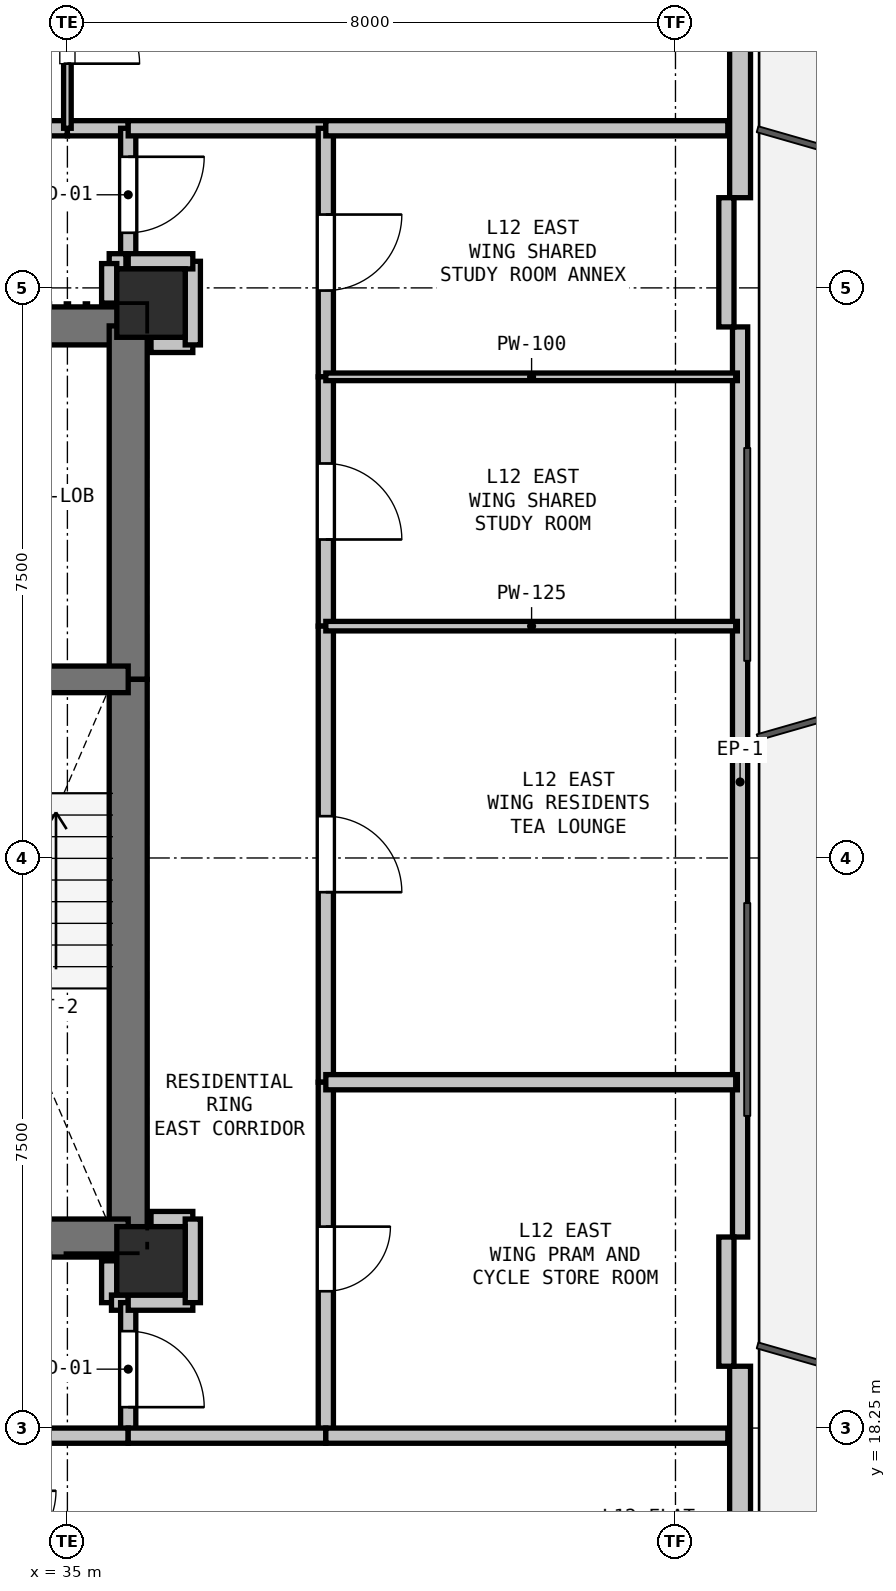
"""IFC4 building model, lengths in metres.
Left out: names, types, materials, properties, quantities, classifications, styles, units other than length and angle.
Written with IfcOpenShell. Run it as: python <this file> out.ifc"""

import sys

from ifc_helpers import new_model, si_unit, direction, frame, frame_2d, origin, origin_2d, place, context, subcontext, project, spatial, rectangle, extrude, element, fill, save


model = new_model("IFC4")
c1 = context("Model", 3, precision=1e-05, world=origin(), true_north=direction((0.0, 1.0)))
c2 = subcontext(c1, "Body", "Model", "MODEL_VIEW")
j1 = project(units=[si_unit("LENGTHUNIT", "METRE"), si_unit("PLANEANGLEUNIT", "RADIAN")], contexts=[c1])
p1 = place(None, origin())
s1 = spatial("IfcSite", under=j1, at=p1, CompositionType="ELEMENT")
p2 = place(p1, origin())
s2 = spatial("IfcBuilding", under=s1, at=p2, CompositionType="ELEMENT")
p3 = place(p2, frame((0.0, 0.0, 45.6)))
s3 = spatial("IfcBuildingStorey", under=s2, at=p3, CompositionType="ELEMENT", Elevation=45.6)
for number, where, z_axis, x_axis in (
    (1, (36.1, 33.05, 0.0), (0.0, 0.0, 1.0), (1.0, 0.0, 0.0)),
    (2, (36.1, 20.45, 0.0), (0.0, 0.0, 1.0), (1.0, 0.0, 0.0)),
):
    element("IfcColumn", number, at=place(p3, frame(where, z_axis=z_axis, x_axis=x_axis)), inside=s3, PredefinedType="COLUMN", context=c2, shape_type="SweptSolid", body=[
        extrude(rectangle(XDim=0.9, YDim=0.9, at=origin_2d()), origin(), (0.0, 0.0, 1.0), 3.3),
    ])
p4 = place(p3, frame((43.85, 47.11, 0.0), z_axis=(0.0, 0.0, 1.0), x_axis=(0.0, -1.0, 0.0)))
e3 = element("IfcWall", 3, at=p4, inside=s3, PredefinedType="SOLIDWALL", context=c2, shape_type="SweptSolid", body=[
    extrude(rectangle(XDim=12.673, YDim=0.275, at=frame_2d((6.336, 0.0))), origin(), (0.0, 0.0, 1.0), 2.66),
])
p5 = place(p4, frame((2.325, 0.0, 0.0)))
e4 = element("IfcOpeningElement", 4, at=p5, cuts=e3, PredefinedType="OPENING", context=c2, shape_type="SweptSolid", body=[
    extrude(rectangle(XDim=1.0, YDim=2.1, at=frame_2d((0.5, 1.05))), frame((0.0, 0.147, 0.0), z_axis=(0.0, -1.0, 0.0), x_axis=(1.0, 0.0, 0.0)), (0.0, 0.0, 1.0), 0.295),
])
p6 = place(p3, frame((43.85, 32.737, 0.0), z_axis=(0.0, 0.0, 1.0), x_axis=(0.0, -1.0, 0.0)))
e5 = element("IfcWall", 5, at=p6, inside=s3, PredefinedType="PARAPET", context=c2, shape_type="SweptSolid", body=[
    extrude(rectangle(XDim=11.973, YDim=0.2, at=frame_2d((5.987, 0.0))), origin(), (0.0, 0.0, 1.0), 0.2),
])
p7 = place(p3, frame((43.85, 19.063, 0.0), z_axis=(0.0, 0.0, 1.0), x_axis=(0.0, -1.0, 0.0)))
e6 = element("IfcWall", 6, at=p7, inside=s3, PredefinedType="SOLIDWALL", context=c2, shape_type="SweptSolid", body=[
    extrude(rectangle(XDim=12.673, YDim=0.275, at=frame_2d((6.336, 0.0))), origin(), (0.0, 0.0, 1.0), 2.66),
])
for number, where, z_axis, x_axis in (
    (7, (43.67, 34.437, 0.0), (0.0, 0.0, 1.0), (0.0, -1.0, 0.0)),
    (8, (43.67, 20.763, 0.0), (0.0, 0.0, 1.0), (0.0, -1.0, 0.0)),
):
    element("IfcWall", number, at=place(p3, frame(where, z_axis=z_axis, x_axis=x_axis)), inside=s3, PredefinedType="PARAPET", context=c2, shape_type="SweptSolid", body=[
        extrude(rectangle(XDim=1.7, YDim=0.2, at=frame_2d((0.85, 0.0))), origin(), (0.0, 0.0, 1.0), 2.66),
    ])
p8 = place(p3, frame((32.35, 32.75, 0.0), z_axis=(0.0, 0.0, 1.0), x_axis=(1.0, 0.0, 0.0)))
e9 = element("IfcWall", 9, at=p8, inside=s3, PredefinedType="SHEAR", context=c2, shape_type="SweptSolid", body=[
    extrude(rectangle(XDim=3.45, YDim=0.5, at=frame_2d((1.725, 0.0))), origin(), (0.0, 0.0, 1.0), 3.04),
])
p9 = place(p8, frame((0.65, 0.0, 0.0)))
e10 = element("IfcOpeningElement", 10, at=p9, cuts=e9, PredefinedType="OPENING", context=c2, shape_type="SweptSolid", body=[
    extrude(rectangle(XDim=1.15, YDim=2.15, at=frame_2d((0.575, 1.075))), frame((0.0, 0.26, 0.0), z_axis=(0.0, -1.0, 0.0), x_axis=(1.0, 0.0, 0.0)), (0.0, 0.0, 1.0), 0.52),
])
p10 = place(p3, frame((35.8, 32.75, 0.0), z_axis=(0.0, 0.0, 1.0), x_axis=(0.0, -1.0, 0.0)))
e11 = element("IfcWall", 11, at=p10, inside=s3, PredefinedType="SHEAR", context=c2, shape_type="SweptSolid", body=[
    extrude(rectangle(XDim=4.65, YDim=0.5, at=frame_2d((2.325, 0.0))), origin(), (0.0, 0.0, 1.0), 3.04),
])
p11 = place(p3, frame((35.8, 28.1, 0.0), z_axis=(0.0, 0.0, 1.0), x_axis=(0.0, -1.0, 0.0)))
e12 = element("IfcWall", 12, at=p11, inside=s3, PredefinedType="SHEAR", context=c2, shape_type="SweptSolid", body=[
    extrude(rectangle(XDim=7.35, YDim=0.5, at=frame_2d((3.675, 0.0))), origin(), (0.0, 0.0, 1.0), 3.04),
])
p12 = place(p3, frame((35.8, 20.75, 0.0), z_axis=(0.0, 0.0, 1.0), x_axis=(-1.0, 0.0, 0.0)))
e13 = element("IfcWall", 13, at=p12, inside=s3, PredefinedType="SHEAR", context=c2, shape_type="SweptSolid", body=[
    extrude(rectangle(XDim=3.45, YDim=0.5, at=frame_2d((1.725, 0.0))), origin(), (0.0, 0.0, 1.0), 3.04),
])
p13 = place(p3, frame((32.35, 28.1, 0.0), z_axis=(0.0, 0.0, 1.0), x_axis=(1.0, 0.0, 0.0)))
e14 = element("IfcWall", 14, at=p13, inside=s3, PredefinedType="SHEAR", context=c2, shape_type="SweptSolid", body=[
    extrude(rectangle(XDim=3.45, YDim=0.35, at=frame_2d((1.725, 0.0))), origin(), (0.0, 0.0, 1.0), 3.04),
])
p14 = place(p13, frame((1.15, 0.0, 0.0)))
e15 = element("IfcOpeningElement", 15, at=p14, cuts=e14, PredefinedType="OPENING", context=c2, shape_type="SweptSolid", body=[
    extrude(rectangle(XDim=1.15, YDim=2.15, at=frame_2d((0.575, 1.075))), frame((0.0, 0.185, 0.0), z_axis=(0.0, -1.0, 0.0), x_axis=(1.0, 0.0, 0.0)), (0.0, 0.0, 1.0), 0.37),
])
p15 = place(p3, frame((35.55, 20.45, 0.0), z_axis=(0.0, 0.0, 1.0), x_axis=(0.0, -1.0, 0.0)))
e16 = element("IfcWall", 16, at=p15, inside=s3, PredefinedType="PARTITIONING", context=c2, shape_type="SweptSolid", body=[
    extrude(rectangle(XDim=0.55, YDim=0.2, at=frame_2d((0.275, 0.0))), origin(), (0.0, 0.0, 1.0), 2.488),
])
p16 = place(p3, frame((35.58, 19.9, 0.0), z_axis=(0.0, 0.0, 1.0), x_axis=(1.0, 0.0, 0.0)))
e17 = element("IfcWall", 17, at=p16, inside=s3, PredefinedType="PARTITIONING", context=c2, shape_type="SweptSolid", body=[
    extrude(rectangle(XDim=0.22, YDim=0.2, at=frame_2d((0.11, 0.0))), origin(), (0.0, 0.0, 1.0), 3.04),
])
p17 = place(p3, frame((35.8, 19.9, 0.0), z_axis=(0.0, 0.0, 1.0), x_axis=(0.0, -1.0, 0.0)))
e18 = element("IfcWall", 18, at=p17, inside=s3, PredefinedType="PARTITIONING", context=c2, shape_type="SweptSolid", body=[
    extrude(rectangle(XDim=1.75, YDim=0.2, at=frame_2d((0.875, 0.0))), origin(), (0.0, 0.0, 1.0), 3.04),
])
p18 = place(p17, frame((0.375, 0.0, 0.0)))
e19 = element("IfcOpeningElement", 19, at=p18, cuts=e18, PredefinedType="OPENING", context=c2, shape_type="SweptSolid", body=[
    extrude(rectangle(XDim=1.0, YDim=2.15, at=frame_2d((0.5, 1.075))), frame((0.0, 0.11, 0.0), z_axis=(0.0, -1.0, 0.0), x_axis=(1.0, 0.0, 0.0)), (0.0, 0.0, 1.0), 0.22),
])
p19 = place(p3, frame((35.8, 18.15, 0.0), z_axis=(0.0, 0.0, 1.0), x_axis=(-1.0, 0.0, 0.0)))
e20 = element("IfcWall", 20, at=p19, inside=s3, PredefinedType="PARTITIONING", context=c2, shape_type="SweptSolid", body=[
    extrude(rectangle(XDim=1.9, YDim=0.2, at=frame_2d((0.95, 0.0))), origin(), (0.0, 0.0, 1.0), 3.04),
])
p20 = place(p3, frame((32.5, 35.35, 0.0), z_axis=(0.0, 0.0, 1.0), x_axis=(1.0, 0.0, 0.0)))
e21 = element("IfcWall", 21, at=p20, inside=s3, PredefinedType="PARTITIONING", context=c2, shape_type="SweptSolid", body=[
    extrude(rectangle(XDim=2.5, YDim=0.2, at=frame_2d((1.25, 0.0))), origin(), (0.0, 0.0, 1.0), 3.04),
])
p21 = place(p20, frame((0.75, 0.0, 0.0)))
e22 = element("IfcOpeningElement", 22, at=p21, cuts=e21, PredefinedType="OPENING", context=c2, shape_type="SweptSolid", body=[
    extrude(rectangle(XDim=1.0, YDim=2.15, at=frame_2d((0.5, 1.075))), frame((0.0, 0.11, 0.0), z_axis=(0.0, -1.0, 0.0), x_axis=(1.0, 0.0, 0.0)), (0.0, 0.0, 1.0), 0.22),
])
p22 = place(p3, frame((35.0, 35.35, 0.0), z_axis=(0.0, 0.0, 1.0), x_axis=(1.0, 0.0, 0.0)))
e23 = element("IfcWall", 23, at=p22, inside=s3, PredefinedType="PARTITIONING", context=c2, shape_type="SweptSolid", body=[
    extrude(rectangle(XDim=0.8, YDim=0.2, at=frame_2d((0.4, 0.0))), origin(), (0.0, 0.0, 1.0), 3.04),
])
p23 = place(p3, frame((35.8, 35.35, 0.0), z_axis=(0.0, 0.0, 1.0), x_axis=(0.0, -1.0, 0.0)))
e24 = element("IfcWall", 24, at=p23, inside=s3, PredefinedType="PARTITIONING", context=c2, shape_type="SweptSolid", body=[
    extrude(rectangle(XDim=1.75, YDim=0.2, at=frame_2d((0.875, 0.0))), origin(), (0.0, 0.0, 1.0), 3.04),
])
p24 = place(p23, frame((0.375, 0.0, 0.0)))
e25 = element("IfcOpeningElement", 25, at=p24, cuts=e24, PredefinedType="OPENING", context=c2, shape_type="SweptSolid", body=[
    extrude(rectangle(XDim=1.0, YDim=2.15, at=frame_2d((0.5, 1.075))), frame((0.0, 0.11, 0.0), z_axis=(0.0, -1.0, 0.0), x_axis=(1.0, 0.0, 0.0)), (0.0, 0.0, 1.0), 0.22),
])
p25 = place(p3, frame((35.77, 33.6, 0.0), z_axis=(0.0, 0.0, 1.0), x_axis=(-1.0, 0.0, 0.0)))
e26 = element("IfcWall", 26, at=p25, inside=s3, PredefinedType="PARTITIONING", context=c2, shape_type="SweptSolid", body=[
    extrude(rectangle(XDim=0.22, YDim=0.2, at=frame_2d((0.11, 0.0))), origin(), (0.0, 0.0, 1.0), 3.04),
])
p26 = place(p3, frame((35.55, 33.57, 0.0), z_axis=(0.0, 0.0, 1.0), x_axis=(0.0, -1.0, 0.0)))
e27 = element("IfcWall", 27, at=p26, inside=s3, PredefinedType="PARTITIONING", context=c2, shape_type="SweptSolid", body=[
    extrude(rectangle(XDim=0.52, YDim=0.2, at=frame_2d((0.26, 0.0))), origin(), (0.0, 0.0, 1.0), 2.488),
])
for number, where, z_axis, x_axis in (
    (28, (36.65, 21.0, 0.0), (0.0, 0.0, 1.0), (-1.0, 0.0, 0.0)),
    (29, (36.1, 32.5, 0.0), (0.0, 0.0, 1.0), (1.0, 0.0, 0.0)),
):
    element("IfcWall", number, at=place(p3, frame(where, z_axis=z_axis, x_axis=x_axis)), inside=s3, PredefinedType="PARTITIONING", context=c2, shape_type="SweptSolid", body=[
        extrude(rectangle(XDim=0.55, YDim=0.2, at=frame_2d((0.275, 0.0))), origin(), (0.0, 0.0, 1.0), 2.488),
    ])
p27 = place(p3, frame((36.65, 32.5, 0.0), z_axis=(0.0, 0.0, 1.0), x_axis=(0.0, 1.0, 0.0)))
e30 = element("IfcWall", 30, at=p27, inside=s3, PredefinedType="PARTITIONING", context=c2, shape_type="SweptSolid", body=[
    extrude(rectangle(XDim=1.1, YDim=0.2, at=frame_2d((0.55, 0.0))), origin(), (0.0, 0.0, 1.0), 2.337),
])
p28 = place(p3, frame((36.65, 33.6, 0.0), z_axis=(0.0, 0.0, 1.0), x_axis=(-1.0, 0.0, 0.0)))
e31 = element("IfcWall", 31, at=p28, inside=s3, PredefinedType="PARTITIONING", context=c2, shape_type="SweptSolid", body=[
    extrude(rectangle(XDim=0.85, YDim=0.2, at=frame_2d((0.425, 0.0))), origin(), (0.0, 0.0, 1.0), 2.337),
])
p29 = place(p3, frame((35.8, 35.35, 0.0), z_axis=(0.0, 0.0, 1.0), x_axis=(1.0, 0.0, 0.0)))
e32 = element("IfcWall", 32, at=p29, inside=s3, PredefinedType="PARTITIONING", context=c2, shape_type="SweptSolid", body=[
    extrude(rectangle(XDim=2.6, YDim=0.2, at=frame_2d((1.3, 0.0))), origin(), (0.0, 0.0, 1.0), 2.337),
])
p30 = place(p3, frame((38.4, 35.35, 0.0), z_axis=(0.0, 0.0, 1.0), x_axis=(0.0, -1.0, 0.0)))
e33 = element("IfcWall", 33, at=p30, inside=s3, PredefinedType="PARTITIONING", context=c2, shape_type="SweptSolid", body=[
    extrude(rectangle(XDim=3.27, YDim=0.2, at=frame_2d((1.635, 0.0))), origin(), (0.0, 0.0, 1.0), 2.337),
])
p31 = place(p30, frame((1.135, 0.0, 0.0)))
e34 = element("IfcOpeningElement", 34, at=p31, cuts=e33, PredefinedType="OPENING", context=c2, shape_type="SweptSolid", body=[
    extrude(rectangle(XDim=1.0, YDim=2.15, at=frame_2d((0.5, 1.075))), frame((0.0, 0.11, 0.0), z_axis=(0.0, -1.0, 0.0), x_axis=(1.0, 0.0, 0.0)), (0.0, 0.0, 1.0), 0.22),
])
p32 = place(p3, frame((38.4, 32.08, 0.0), z_axis=(0.0, 0.0, 1.0), x_axis=(0.0, -1.0, 0.0)))
e35 = element("IfcWall", 35, at=p32, inside=s3, PredefinedType="PARTITIONING", context=c2, shape_type="SweptSolid", body=[
    extrude(rectangle(XDim=3.28, YDim=0.2, at=frame_2d((1.64, 0.0))), origin(), (0.0, 0.0, 1.0), 3.04),
])
p33 = place(p32, frame((1.14, 0.0, 0.0)))
e36 = element("IfcOpeningElement", 36, at=p33, cuts=e35, PredefinedType="OPENING", context=c2, shape_type="SweptSolid", body=[
    extrude(rectangle(XDim=1.0, YDim=2.15, at=frame_2d((0.5, 1.075))), frame((0.0, 0.11, 0.0), z_axis=(0.0, -1.0, 0.0), x_axis=(1.0, 0.0, 0.0)), (0.0, 0.0, 1.0), 0.22),
])
p34 = place(p3, frame((38.4, 28.8, 0.0), z_axis=(0.0, 0.0, 1.0), x_axis=(0.0, -1.0, 0.0)))
e37 = element("IfcWall", 37, at=p34, inside=s3, PredefinedType="PARTITIONING", context=c2, shape_type="SweptSolid", body=[
    extrude(rectangle(XDim=6.0, YDim=0.2, at=frame_2d((3.0, 0.0))), origin(), (0.0, 0.0, 1.0), 3.04),
])
p35 = place(p34, frame((2.5, 0.0, 0.0)))
e38 = element("IfcOpeningElement", 38, at=p35, cuts=e37, PredefinedType="OPENING", context=c2, shape_type="SweptSolid", body=[
    extrude(rectangle(XDim=1.0, YDim=2.15, at=frame_2d((0.5, 1.075))), frame((0.0, 0.11, 0.0), z_axis=(0.0, -1.0, 0.0), x_axis=(1.0, 0.0, 0.0)), (0.0, 0.0, 1.0), 0.22),
])
p36 = place(p3, frame((38.4, 22.8, 0.0), z_axis=(0.0, 0.0, 1.0), x_axis=(0.0, -1.0, 0.0)))
e39 = element("IfcWall", 39, at=p36, inside=s3, PredefinedType="PARTITIONING", context=c2, shape_type="SweptSolid", body=[
    extrude(rectangle(XDim=4.65, YDim=0.2, at=frame_2d((2.325, 0.0))), origin(), (0.0, 0.0, 1.0), 3.04),
])
p37 = place(p36, frame((1.9, 0.0, 0.0)))
e40 = element("IfcOpeningElement", 40, at=p37, cuts=e39, PredefinedType="OPENING", context=c2, shape_type="SweptSolid", body=[
    extrude(rectangle(XDim=0.85, YDim=2.1, at=frame_2d((0.425, 1.05))), frame((0.0, 0.11, 0.0), z_axis=(0.0, -1.0, 0.0), x_axis=(1.0, 0.0, 0.0)), (0.0, 0.0, 1.0), 0.22),
])
p38 = place(p3, frame((38.4, 18.15, 0.0), z_axis=(0.0, 0.0, 1.0), x_axis=(-1.0, 0.0, 0.0)))
e41 = element("IfcWall", 41, at=p38, inside=s3, PredefinedType="PARTITIONING", context=c2, shape_type="SweptSolid", body=[
    extrude(rectangle(XDim=2.6, YDim=0.2, at=frame_2d((1.3, 0.0))), origin(), (0.0, 0.0, 1.0), 2.337),
])
p39 = place(p3, frame((35.8, 19.9, 0.0), z_axis=(0.0, 0.0, 1.0), x_axis=(1.0, 0.0, 0.0)))
e42 = element("IfcWall", 42, at=p39, inside=s3, PredefinedType="PARTITIONING", context=c2, shape_type="SweptSolid", body=[
    extrude(rectangle(XDim=0.85, YDim=0.2, at=frame_2d((0.425, 0.0))), origin(), (0.0, 0.0, 1.0), 2.337),
])
p40 = place(p3, frame((36.65, 19.9, 0.0), z_axis=(0.0, 0.0, 1.0), x_axis=(0.0, 1.0, 0.0)))
e43 = element("IfcWall", 43, at=p40, inside=s3, PredefinedType="PARTITIONING", context=c2, shape_type="SweptSolid", body=[
    extrude(rectangle(XDim=1.1, YDim=0.2, at=frame_2d((0.55, 0.0))), origin(), (0.0, 0.0, 1.0), 3.04),
])
p41 = place(p3, frame((35.0, 38.0, 0.0), z_axis=(0.0, 0.0, 1.0), x_axis=(0.0, -1.0, 0.0)))
e44 = element("IfcWall", 44, at=p41, inside=s3, PredefinedType="PARTITIONING", context=c2, shape_type="SweptSolid", body=[
    extrude(rectangle(XDim=2.65, YDim=0.1, at=frame_2d((1.325, 0.0))), origin(), (0.0, 0.0, 1.0), 3.04),
])
p42 = place(p41, frame((0.85, 0.0, 0.0)))
e45 = element("IfcOpeningElement", 45, at=p42, cuts=e44, PredefinedType="OPENING", context=c2, shape_type="SweptSolid", body=[
    extrude(rectangle(XDim=0.95, YDim=2.1, at=frame_2d((0.475, 1.05))), frame((0.0, 0.06, 0.0), z_axis=(0.0, -1.0, 0.0), x_axis=(1.0, 0.0, 0.0)), (0.0, 0.0, 1.0), 0.12),
])
p43 = place(p3, frame((43.688, 35.35, 0.0), z_axis=(0.0, 0.0, 1.0), x_axis=(-1.0, 0.0, 0.0)))
e46 = element("IfcWall", 46, at=p43, inside=s3, PredefinedType="PARTITIONING", context=c2, shape_type="SweptSolid", body=[
    extrude(rectangle(XDim=5.289, YDim=0.2, at=frame_2d((2.644, 0.0))), origin(), (0.0, 0.0, 1.0), 2.337),
])
p44 = place(p3, frame((38.4, 18.15, 0.0), z_axis=(0.0, 0.0, 1.0), x_axis=(1.0, 0.0, 0.0)))
e47 = element("IfcWall", 47, at=p44, inside=s3, PredefinedType="PARTITIONING", context=c2, shape_type="SweptSolid", body=[
    extrude(rectangle(XDim=5.289, YDim=0.2, at=frame_2d((2.644, 0.0))), origin(), (0.0, 0.0, 1.0), 2.365),
])
p45 = place(p3, frame((38.4, 32.08, 0.0), z_axis=(0.0, 0.0, 1.0), x_axis=(1.0, 0.0, 0.0)))
e48 = element("IfcWall", 48, at=p45, inside=s3, PredefinedType="PARTITIONING", context=c2, shape_type="SweptSolid", body=[
    extrude(rectangle(XDim=5.414, YDim=0.1, at=frame_2d((2.707, 0.0))), origin(), (0.0, 0.0, 1.0), 2.365),
])
p46 = place(p3, frame((43.814, 28.8, 0.0), z_axis=(0.0, 0.0, 1.0), x_axis=(-1.0, 0.0, 0.0)))
e49 = element("IfcWall", 49, at=p46, inside=s3, PredefinedType="PARTITIONING", context=c2, shape_type="SweptSolid", body=[
    extrude(rectangle(XDim=5.414, YDim=0.125, at=frame_2d((2.707, 0.0))), origin(), (0.0, 0.0, 1.0), 2.365),
])
p47 = place(p3, frame((43.814, 22.8, 0.0), z_axis=(0.0, 0.0, 1.0), x_axis=(-1.0, 0.0, 0.0)))
e50 = element("IfcWall", 50, at=p47, inside=s3, PredefinedType="PARTITIONING", context=c2, shape_type="SweptSolid", body=[
    extrude(rectangle(XDim=5.414, YDim=0.2, at=frame_2d((2.707, 0.0))), origin(), (0.0, 0.0, 1.0), 2.365),
])
p48 = place(p18, origin())
e51 = element("IfcDoor", 51, at=p48, inside=s3, OperationType="SINGLE_SWING_RIGHT", PredefinedType="DOOR", context=c2, shape_type="SweptSolid", body=[
    extrude(rectangle(XDim=1.0, YDim=2.15, at=frame_2d((0.5, 1.075))), frame((0.0, 0.025, 0.0), z_axis=(0.0, -1.0, 0.0), x_axis=(1.0, 0.0, 0.0)), (0.0, 0.0, 1.0), 0.05),
])
fill(e19, e51)
p49 = place(p24, origin())
e52 = element("IfcDoor", 52, at=p49, inside=s3, OperationType="SINGLE_SWING_LEFT", PredefinedType="DOOR", context=c2, shape_type="SweptSolid", body=[
    extrude(rectangle(XDim=1.0, YDim=2.15, at=frame_2d((0.5, 1.075))), frame((0.0, 0.025, 0.0), z_axis=(0.0, -1.0, 0.0), x_axis=(1.0, 0.0, 0.0)), (0.0, 0.0, 1.0), 0.05),
])
fill(e25, e52)
p50 = place(p33, origin())
e53 = element("IfcDoor", 53, at=p50, inside=s3, OperationType="SINGLE_SWING_RIGHT", PredefinedType="DOOR", context=c2, shape_type="SweptSolid", body=[
    extrude(rectangle(XDim=1.0, YDim=2.15, at=frame_2d((0.5, 1.075))), frame((0.0, 0.025, 0.0), z_axis=(0.0, -1.0, 0.0), x_axis=(1.0, 0.0, 0.0)), (0.0, 0.0, 1.0), 0.05),
])
fill(e36, e53)
p51 = place(p31, origin())
e54 = element("IfcDoor", 54, at=p51, inside=s3, OperationType="SINGLE_SWING_LEFT", PredefinedType="DOOR", context=c2, shape_type="SweptSolid", body=[
    extrude(rectangle(XDim=1.0, YDim=2.15, at=frame_2d((0.5, 1.075))), frame((0.0, 0.025, 0.0), z_axis=(0.0, -1.0, 0.0), x_axis=(1.0, 0.0, 0.0)), (0.0, 0.0, 1.0), 0.05),
])
fill(e34, e54)
p52 = place(p35, origin())
e55 = element("IfcDoor", 55, at=p52, inside=s3, OperationType="SINGLE_SWING_RIGHT", PredefinedType="DOOR", context=c2, shape_type="SweptSolid", body=[
    extrude(rectangle(XDim=1.0, YDim=2.15, at=frame_2d((0.5, 1.075))), frame((0.0, 0.025, 0.0), z_axis=(0.0, -1.0, 0.0), x_axis=(1.0, 0.0, 0.0)), (0.0, 0.0, 1.0), 0.05),
])
fill(e38, e55)
p53 = place(p37, origin())
e56 = element("IfcDoor", 56, at=p53, inside=s3, OperationType="SINGLE_SWING_LEFT", PredefinedType="DOOR", context=c2, shape_type="SweptSolid", body=[
    extrude(rectangle(XDim=0.85, YDim=2.1, at=frame_2d((0.425, 1.05))), frame((0.0, 0.025, 0.0), z_axis=(0.0, -1.0, 0.0), x_axis=(1.0, 0.0, 0.0)), (0.0, 0.0, 1.0), 0.05),
])
fill(e40, e56)
p54 = place(p42, origin())
e57 = element("IfcDoor", 57, at=p54, inside=s3, OperationType="SINGLE_SWING_RIGHT", PredefinedType="DOOR", context=c2, shape_type="SweptSolid", body=[
    extrude(rectangle(XDim=0.95, YDim=2.1, at=frame_2d((0.475, 1.05))), frame((0.0, 0.025, 0.0), z_axis=(0.0, -1.0, 0.0), x_axis=(1.0, 0.0, 0.0)), (0.0, 0.0, 1.0), 0.05),
])
fill(e45, e57)
save(model, sys.argv[1])
